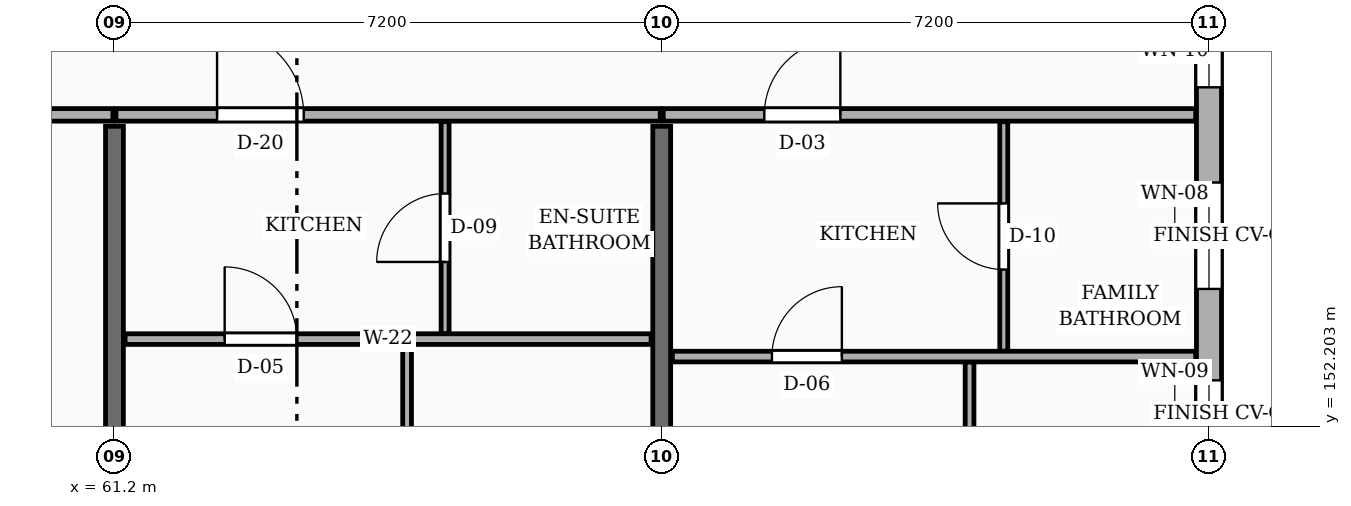
"""IFC4 building model, lengths in metres.
Left out: names, types, materials, properties, quantities, classifications, styles, units other than length and angle.
Written with IfcOpenShell. Run it as: python <this file> out.ifc"""

import sys

from ifc_helpers import new_model, si_unit, direction, frame, frame_2d, origin, place, context, subcontext, project, spatial, rectangle, extrude, element, fill, save


model = new_model("IFC4")
c1 = context("Model", 3, precision=1e-05, world=origin(), true_north=direction((0.0, 1.0)))
c2 = subcontext(c1, "Body", "Model", "MODEL_VIEW")
j1 = project(units=[si_unit("LENGTHUNIT", "METRE"), si_unit("PLANEANGLEUNIT", "RADIAN")], contexts=[c1])
p1 = place(None, origin())
s1 = spatial("IfcSite", under=j1, at=p1, CompositionType="ELEMENT")
p2 = place(p1, origin())
s2 = spatial("IfcBuilding", under=s1, at=p2, CompositionType="ELEMENT")
p3 = place(p2, frame((0.0, 0.0, 20.25)))
s3 = spatial("IfcBuildingStorey", under=s2, at=p3, CompositionType="ELEMENT", Elevation=20.25)
for number, where, z_axis, x_axis in (
    (1, (61.2, 144.275, 0.0), (0.0, 0.0, 1.0), (0.0, 1.0, 0.0)),
    (2, (68.4, 144.275, 0.0), (0.0, 0.0, 1.0), (0.0, 1.0, 0.0)),
):
    element("IfcWall", number, at=place(p3, frame(where, z_axis=z_axis, x_axis=x_axis)), inside=s3, PredefinedType="SOLIDWALL", context=c2, shape_type="SweptSolid", body=[
        extrude(rectangle(XDim=11.875, YDim=0.235, at=frame_2d((5.938, 0.0))), origin(), (0.0, 0.0, 1.0), 2.185),
    ])
p4 = place(p3, frame((75.6, 151.475, 0.0), z_axis=(0.0, 0.0, 1.0), x_axis=(0.0, 1.0, 0.0)))
e3 = element("IfcWall", 3, at=p4, inside=s3, PredefinedType="SOLIDWALL", context=c2, shape_type="SweptSolid", body=[
    extrude(rectangle(XDim=6.65, YDim=0.33, at=frame_2d((3.325, 0.0))), origin(), (0.0, 0.0, 1.0), 2.455),
])
p5 = place(p4, frame((0.452, 0.0, 0.78)))
e4 = element("IfcOpeningElement", 4, at=p5, cuts=e3, PredefinedType="OPENING", context=c2, shape_type="SweptSolid", body=[
    extrude(rectangle(XDim=0.88, YDim=1.26, at=frame_2d((0.44, 0.63))), frame((0.0, 0.175, 0.0), z_axis=(0.0, -1.0, 0.0), x_axis=(1.0, 0.0, 0.0)), (0.0, 0.0, 1.0), 0.35),
])
p6 = place(p4, frame((2.535, 0.0, 0.78)))
e5 = element("IfcOpeningElement", 5, at=p6, cuts=e3, PredefinedType="OPENING", context=c2, shape_type="SweptSolid", body=[
    extrude(rectangle(XDim=1.4, YDim=1.15, at=frame_2d((0.7, 0.575))), frame((0.0, 0.175, 0.0), z_axis=(0.0, -1.0, 0.0), x_axis=(1.0, 0.0, 0.0)), (0.0, 0.0, 1.0), 0.35),
])
p7 = place(p4, frame((5.188, 0.0, 0.78)))
e6 = element("IfcOpeningElement", 6, at=p7, cuts=e3, PredefinedType="OPENING", context=c2, shape_type="SweptSolid", body=[
    extrude(rectangle(XDim=0.96, YDim=1.26, at=frame_2d((0.48, 0.63))), frame((0.0, 0.175, 0.0), z_axis=(0.0, -1.0, 0.0), x_axis=(1.0, 0.0, 0.0)), (0.0, 0.0, 1.0), 0.35),
])
p8 = place(p3, frame((54.02, 156.3, 0.0), z_axis=(0.0, 0.0, 1.0), x_axis=(1.0, 0.0, 0.0)))
e7 = element("IfcWall", 7, at=p8, inside=s3, PredefinedType="PARTITIONING", context=c2, shape_type="SweptSolid", body=[
    extrude(rectangle(XDim=7.16, YDim=0.165, at=frame_2d((3.58, 0.0))), origin(), (0.0, 0.0, 1.0), 2.32),
])
p9 = place(p8, frame((4.78, 0.0, 0.0)))
e8 = element("IfcOpeningElement", 8, at=p9, cuts=e7, PredefinedType="OPENING", context=c2, shape_type="SweptSolid", body=[
    extrude(rectangle(XDim=0.94, YDim=2.12, at=frame_2d((0.47, 1.06))), frame((0.0, 0.093, 0.0), z_axis=(0.0, -1.0, 0.0), x_axis=(1.0, 0.0, 0.0)), (0.0, 0.0, 1.0), 0.185),
])
p10 = place(p3, frame((61.22, 156.3, 0.0), z_axis=(0.0, 0.0, 1.0), x_axis=(1.0, 0.0, 0.0)))
e9 = element("IfcWall", 9, at=p10, inside=s3, PredefinedType="PARTITIONING", context=c2, shape_type="SweptSolid", body=[
    extrude(rectangle(XDim=7.16, YDim=0.165, at=frame_2d((3.58, 0.0))), origin(), (0.0, 0.0, 1.0), 2.32),
])
p11 = place(p10, frame((1.33, 0.0, 0.0)))
e10 = element("IfcOpeningElement", 10, at=p11, cuts=e9, PredefinedType="OPENING", context=c2, shape_type="SweptSolid", body=[
    extrude(rectangle(XDim=1.14, YDim=2.18, at=frame_2d((0.57, 1.09))), frame((0.0, 0.093, 0.0), z_axis=(0.0, -1.0, 0.0), x_axis=(1.0, 0.0, 0.0)), (0.0, 0.0, 1.0), 0.185),
])
p12 = place(p3, frame((68.42, 156.3, 0.0), z_axis=(0.0, 0.0, 1.0), x_axis=(1.0, 0.0, 0.0)))
e11 = element("IfcWall", 11, at=p12, inside=s3, PredefinedType="PARTITIONING", context=c2, shape_type="SweptSolid", body=[
    extrude(rectangle(XDim=7.005, YDim=0.165, at=frame_2d((3.502, 0.0))), origin(), (0.0, 0.0, 1.0), 2.32),
])
p13 = place(p12, frame((1.33, 0.0, 0.0)))
e12 = element("IfcOpeningElement", 12, at=p13, cuts=e11, PredefinedType="OPENING", context=c2, shape_type="SweptSolid", body=[
    extrude(rectangle(XDim=1.0, YDim=2.15, at=frame_2d((0.5, 1.075))), frame((0.0, 0.093, 0.0), z_axis=(0.0, -1.0, 0.0), x_axis=(1.0, 0.0, 0.0)), (0.0, 0.0, 1.0), 0.185),
])
p14 = place(p3, frame((65.05, 144.175, 0.0), z_axis=(0.0, 0.0, 1.0), x_axis=(0.0, 1.0, 0.0)))
e13 = element("IfcWall", 13, at=p14, inside=s3, PredefinedType="PARTITIONING", context=c2, shape_type="SweptSolid", body=[
    extrude(rectangle(XDim=9.105, YDim=0.115, at=frame_2d((4.552, 0.0))), origin(), (0.0, 0.0, 1.0), 2.32),
])
p15 = place(p14, frame((4.103, 0.0, 0.0)))
e14 = element("IfcOpeningElement", 14, at=p15, cuts=e13, PredefinedType="OPENING", context=c2, shape_type="SweptSolid", body=[
    extrude(rectangle(XDim=0.9, YDim=2.1, at=frame_2d((0.45, 1.05))), frame((0.0, 0.067, 0.0), z_axis=(0.0, -1.0, 0.0), x_axis=(1.0, 0.0, 0.0)), (0.0, 0.0, 1.0), 0.135),
])
p16 = place(p3, frame((65.55, 153.42, 0.0), z_axis=(0.0, 0.0, 1.0), x_axis=(0.0, 1.0, 0.0)))
e15 = element("IfcWall", 15, at=p16, inside=s3, PredefinedType="PARTITIONING", context=c2, shape_type="SweptSolid", body=[
    extrude(rectangle(XDim=2.79, YDim=0.105, at=frame_2d((1.395, 0.0))), origin(), (0.0, 0.0, 1.0), 2.32),
])
p17 = place(p16, frame((0.945, 0.0, 0.0)))
e16 = element("IfcOpeningElement", 16, at=p17, cuts=e15, PredefinedType="OPENING", context=c2, shape_type="SweptSolid", body=[
    extrude(rectangle(XDim=0.9, YDim=2.05, at=frame_2d((0.45, 1.025))), frame((0.0, 0.062, 0.0), z_axis=(0.0, -1.0, 0.0), x_axis=(1.0, 0.0, 0.0)), (0.0, 0.0, 1.0), 0.125),
])
p18 = place(p3, frame((61.34, 153.35, 0.0), z_axis=(0.0, 0.0, 1.0), x_axis=(1.0, 0.0, 0.0)))
e17 = element("IfcWall", 17, at=p18, inside=s3, PredefinedType="PARTITIONING", context=c2, shape_type="SweptSolid", body=[
    extrude(rectangle(XDim=6.92, YDim=0.14, at=frame_2d((3.46, 0.0))), origin(), (0.0, 0.0, 1.0), 2.32),
])
p19 = place(p18, frame((1.31, 0.0, 0.0)))
e18 = element("IfcOpeningElement", 18, at=p19, cuts=e17, PredefinedType="OPENING", context=c2, shape_type="SweptSolid", body=[
    extrude(rectangle(XDim=0.95, YDim=2.1, at=frame_2d((0.475, 1.05))), frame((0.0, 0.08, 0.0), z_axis=(0.0, -1.0, 0.0), x_axis=(1.0, 0.0, 0.0)), (0.0, 0.0, 1.0), 0.16),
])
p20 = place(p3, frame((72.45, 144.175, 0.0), z_axis=(0.0, 0.0, 1.0), x_axis=(0.0, 1.0, 0.0)))
e19 = element("IfcWall", 19, at=p20, inside=s3, PredefinedType="PARTITIONING", context=c2, shape_type="SweptSolid", body=[
    extrude(rectangle(XDim=8.875, YDim=0.115, at=frame_2d((4.438, 0.0))), origin(), (0.0, 0.0, 1.0), 2.32),
])
p21 = place(p20, frame((3.998, 0.0, 0.0)))
e20 = element("IfcOpeningElement", 20, at=p21, cuts=e19, PredefinedType="OPENING", context=c2, shape_type="SweptSolid", body=[
    extrude(rectangle(XDim=0.88, YDim=2.08, at=frame_2d((0.44, 1.04))), frame((0.0, 0.067, 0.0), z_axis=(0.0, -1.0, 0.0), x_axis=(1.0, 0.0, 0.0)), (0.0, 0.0, 1.0), 0.135),
])
p22 = place(p3, frame((72.9, 153.19, 0.0), z_axis=(0.0, 0.0, 1.0), x_axis=(0.0, 1.0, 0.0)))
e21 = element("IfcWall", 21, at=p22, inside=s3, PredefinedType="PARTITIONING", context=c2, shape_type="SweptSolid", body=[
    extrude(rectangle(XDim=3.02, YDim=0.105, at=frame_2d((1.51, 0.0))), origin(), (0.0, 0.0, 1.0), 2.32),
])
p23 = place(p22, frame((1.075, 0.0, 0.0)))
e22 = element("IfcOpeningElement", 22, at=p23, cuts=e21, PredefinedType="OPENING", context=c2, shape_type="SweptSolid", body=[
    extrude(rectangle(XDim=0.87, YDim=2.05, at=frame_2d((0.435, 1.025))), frame((0.0, 0.062, 0.0), z_axis=(0.0, -1.0, 0.0), x_axis=(1.0, 0.0, 0.0)), (0.0, 0.0, 1.0), 0.125),
])
p24 = place(p3, frame((68.54, 153.12, 0.0), z_axis=(0.0, 0.0, 1.0), x_axis=(1.0, 0.0, 0.0)))
e23 = element("IfcWall", 23, at=p24, inside=s3, PredefinedType="PARTITIONING", context=c2, shape_type="SweptSolid", body=[
    extrude(rectangle(XDim=6.885, YDim=0.14, at=frame_2d((3.442, 0.0))), origin(), (0.0, 0.0, 1.0), 2.32),
])
p25 = place(p24, frame((1.31, 0.0, 0.0)))
e24 = element("IfcOpeningElement", 24, at=p25, cuts=e23, PredefinedType="OPENING", context=c2, shape_type="SweptSolid", body=[
    extrude(rectangle(XDim=0.92, YDim=2.1, at=frame_2d((0.46, 1.05))), frame((0.0, 0.08, 0.0), z_axis=(0.0, -1.0, 0.0), x_axis=(1.0, 0.0, 0.0)), (0.0, 0.0, 1.0), 0.16),
])
p26 = place(p5, origin())
e25 = element("IfcWindow", 25, at=p26, inside=s3, PartitioningType="SINGLE_PANEL", PredefinedType="WINDOW", context=c2, shape_type="SweptSolid", body=[
    extrude(rectangle(XDim=0.88, YDim=1.26, at=frame_2d((0.44, 0.63))), frame((0.0, 0.03, 0.0), z_axis=(0.0, -1.0, 0.0), x_axis=(1.0, 0.0, 0.0)), (0.0, 0.0, 1.0), 0.06),
])
fill(e4, e25)
p27 = place(p6, origin())
e26 = element("IfcWindow", 26, at=p27, inside=s3, PartitioningType="SINGLE_PANEL", PredefinedType="WINDOW", context=c2, shape_type="SweptSolid", body=[
    extrude(rectangle(XDim=1.4, YDim=1.15, at=frame_2d((0.7, 0.575))), frame((0.0, 0.03, 0.0), z_axis=(0.0, -1.0, 0.0), x_axis=(1.0, 0.0, 0.0)), (0.0, 0.0, 1.0), 0.06),
])
fill(e5, e26)
p28 = place(p7, origin())
e27 = element("IfcWindow", 27, at=p28, inside=s3, PartitioningType="SINGLE_PANEL", PredefinedType="WINDOW", context=c2, shape_type="SweptSolid", body=[
    extrude(rectangle(XDim=0.96, YDim=1.26, at=frame_2d((0.48, 0.63))), frame((0.0, 0.03, 0.0), z_axis=(0.0, -1.0, 0.0), x_axis=(1.0, 0.0, 0.0)), (0.0, 0.0, 1.0), 0.06),
])
fill(e6, e27)
p29 = place(p11, origin())
e28 = element("IfcDoor", 28, at=p29, inside=s3, OperationType="SINGLE_SWING_LEFT", PredefinedType="DOOR", context=c2, shape_type="SweptSolid", body=[
    extrude(rectangle(XDim=1.14, YDim=2.18, at=frame_2d((0.57, 1.09))), frame((0.0, 0.025, 0.0), z_axis=(0.0, -1.0, 0.0), x_axis=(1.0, 0.0, 0.0)), (0.0, 0.0, 1.0), 0.05),
])
fill(e10, e28)
p30 = place(p13, origin())
e29 = element("IfcDoor", 29, at=p30, inside=s3, OperationType="SINGLE_SWING_RIGHT", PredefinedType="DOOR", context=c2, shape_type="SweptSolid", body=[
    extrude(rectangle(XDim=1.0, YDim=2.15, at=frame_2d((0.5, 1.075))), frame((0.0, 0.025, 0.0), z_axis=(0.0, -1.0, 0.0), x_axis=(1.0, 0.0, 0.0)), (0.0, 0.0, 1.0), 0.05),
])
fill(e12, e29)
p31 = place(p17, origin())
e30 = element("IfcDoor", 30, at=p31, inside=s3, OperationType="SINGLE_SWING_LEFT", PredefinedType="DOOR", context=c2, shape_type="SweptSolid", body=[
    extrude(rectangle(XDim=0.9, YDim=2.05, at=frame_2d((0.45, 1.025))), frame((0.0, 0.025, 0.0), z_axis=(0.0, -1.0, 0.0), x_axis=(1.0, 0.0, 0.0)), (0.0, 0.0, 1.0), 0.05),
])
fill(e16, e30)
p32 = place(p19, origin())
e31 = element("IfcDoor", 31, at=p32, inside=s3, OperationType="SINGLE_SWING_LEFT", PredefinedType="DOOR", context=c2, shape_type="SweptSolid", body=[
    extrude(rectangle(XDim=0.95, YDim=2.1, at=frame_2d((0.475, 1.05))), frame((0.0, 0.025, 0.0), z_axis=(0.0, -1.0, 0.0), x_axis=(1.0, 0.0, 0.0)), (0.0, 0.0, 1.0), 0.05),
])
fill(e18, e31)
p33 = place(p23, origin())
e32 = element("IfcDoor", 32, at=p33, inside=s3, OperationType="SINGLE_SWING_RIGHT", PredefinedType="DOOR", context=c2, shape_type="SweptSolid", body=[
    extrude(rectangle(XDim=0.87, YDim=2.05, at=frame_2d((0.435, 1.025))), frame((0.0, 0.025, 0.0), z_axis=(0.0, -1.0, 0.0), x_axis=(1.0, 0.0, 0.0)), (0.0, 0.0, 1.0), 0.05),
])
fill(e22, e32)
p34 = place(p25, origin())
e33 = element("IfcDoor", 33, at=p34, inside=s3, OperationType="SINGLE_SWING_RIGHT", PredefinedType="DOOR", context=c2, shape_type="SweptSolid", body=[
    extrude(rectangle(XDim=0.92, YDim=2.1, at=frame_2d((0.46, 1.05))), frame((0.0, 0.025, 0.0), z_axis=(0.0, -1.0, 0.0), x_axis=(1.0, 0.0, 0.0)), (0.0, 0.0, 1.0), 0.05),
])
fill(e24, e33)
save(model, sys.argv[1])
